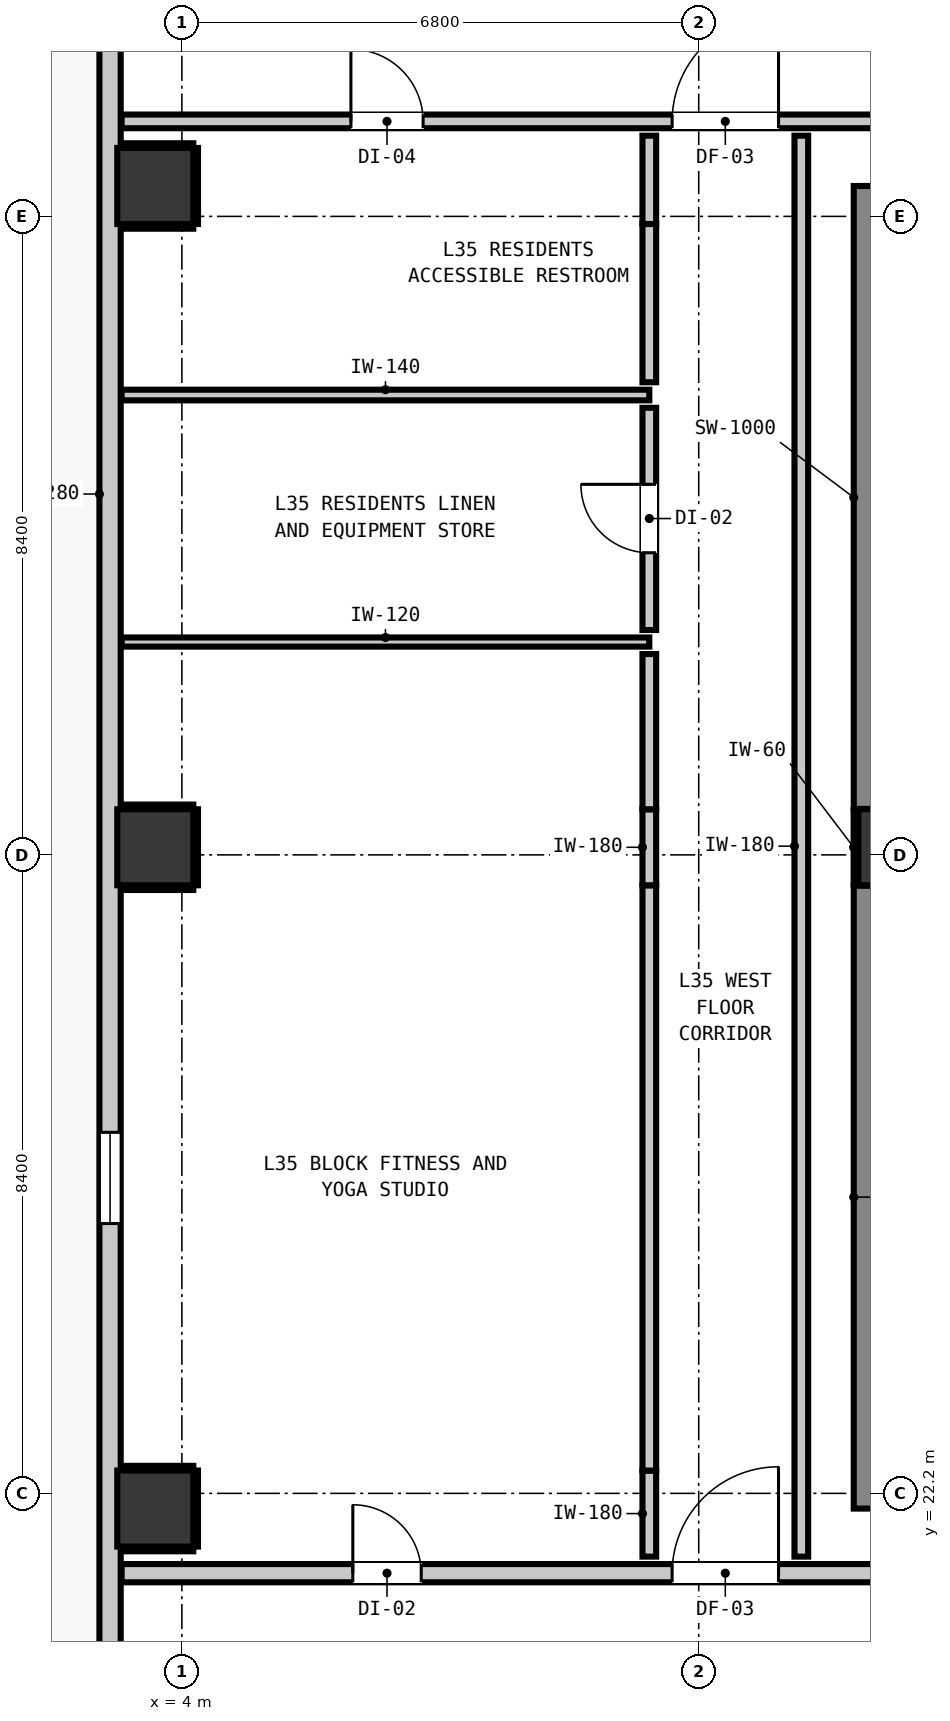
"""IFC4 building model, lengths in metres.
Left out: names, types, materials, properties, quantities, classifications, styles, units other than length and angle.
Written with IfcOpenShell. Run it as: python <this file> out.ifc"""

import sys

from ifc_helpers import new_model, si_unit, direction, frame, frame_2d, origin, origin_2d, place, context, subcontext, project, spatial, rectangle, extrude, element, fill, save


model = new_model("IFC4")
c1 = context("Model", 3, precision=1e-05, world=origin(), true_north=direction((0.0, 1.0)))
c2 = subcontext(c1, "Body", "Model", "MODEL_VIEW")
j1 = project(units=[si_unit("LENGTHUNIT", "METRE"), si_unit("PLANEANGLEUNIT", "RADIAN")], contexts=[c1])
p1 = place(None, origin())
s1 = spatial("IfcSite", under=j1, at=p1, CompositionType="ELEMENT")
p2 = place(p1, origin())
s2 = spatial("IfcBuilding", under=s1, at=p2, CompositionType="ELEMENT")
p3 = place(p2, frame((0.0, 0.0, 122.68)))
s3 = spatial("IfcBuildingStorey", under=s2, at=p3, CompositionType="ELEMENT", Elevation=122.68)
p4 = place(p3, frame((13.4, 30.7, 0.0), z_axis=(0.0, 0.0, 1.0), x_axis=(1.0, 0.0, 0.0)))
e1 = element("IfcColumn", 1, at=p4, inside=s3, PredefinedType="COLUMN", context=c2, shape_type="SweptSolid", body=[
    extrude(rectangle(XDim=1.0, YDim=1.0, at=origin_2d()), origin(), (0.0, 0.0, 1.0), 3.32),
])
p5 = place(p3, frame((13.34, 22.0, 0.0), z_axis=(0.0, 0.0, 1.0), x_axis=(0.0, 1.0, 0.0)))
e2 = element("IfcWall", 2, at=p5, inside=s3, PredefinedType="SHEAR", context=c2, shape_type="SweptSolid", body=[
    extrude(rectangle(XDim=8.195, YDim=1.0, at=frame_2d((4.098, 0.0))), origin(), (0.0, 0.0, 1.0), 3.32),
])
p6 = place(p3, frame((13.34, 31.205, 0.0), z_axis=(0.0, 0.0, 1.0), x_axis=(0.0, 1.0, 0.0)))
e3 = element("IfcWall", 3, at=p6, inside=s3, PredefinedType="SHEAR", context=c2, shape_type="SweptSolid", body=[
    extrude(rectangle(XDim=8.195, YDim=1.0, at=frame_2d((4.097, 0.0))), origin(), (0.0, 0.0, 1.0), 3.32),
])
for number, where, z_axis, x_axis in (
    (4, (3.65, 22.0, 0.0), (0.0, 0.0, 1.0), (1.0, 0.0, 0.0)),
    (5, (3.65, 30.7, 0.0), (0.0, 0.0, 1.0), (1.0, 0.0, 0.0)),
    (6, (3.65, 39.4, 0.0), (0.0, 0.0, 1.0), (1.0, 0.0, 0.0)),
):
    element("IfcColumn", number, at=place(p3, frame(where, z_axis=z_axis, x_axis=x_axis)), inside=s3, PredefinedType="COLUMN", context=c2, shape_type="SweptSolid", body=[
        extrude(rectangle(XDim=1.0, YDim=1.0, at=origin_2d()), origin(), (0.0, 0.0, 1.0), 2.9),
    ])
p7 = place(p3, frame((3.055, 11.355, 0.0), z_axis=(0.0, 0.0, 1.0), x_axis=(0.0, 1.0, 0.0)))
e7 = element("IfcWall", 7, at=p7, inside=s3, PredefinedType="STANDARD", context=c2, shape_type="SweptSolid", body=[
    extrude(rectangle(XDim=32.29, YDim=0.28, at=frame_2d((16.145, 0.0))), origin(), (0.0, 0.0, 1.0), 2.9),
])
p8 = place(p7, frame((5.818, 0.0, 0.0)))
e8 = element("IfcOpeningElement", 8, at=p8, cuts=e7, PredefinedType="OPENING", context=c2, shape_type="SweptSolid", body=[
    extrude(rectangle(XDim=1.0, YDim=2.15, at=frame_2d((0.5, 1.075))), frame((0.0, 0.15, 0.0), z_axis=(0.0, -1.0, 0.0), x_axis=(1.0, 0.0, 0.0)), (0.0, 0.0, 1.0), 0.3),
])
p9 = place(p7, frame((0.47, 0.0, 0.85)))
e9 = element("IfcOpeningElement", 9, at=p9, cuts=e7, PredefinedType="OPENING", context=c2, shape_type="SweptSolid", body=[
    extrude(rectangle(XDim=1.2, YDim=1.8, at=frame_2d((0.6, 0.9))), frame((0.0, 0.15, 0.0), z_axis=(0.0, -1.0, 0.0), x_axis=(1.0, 0.0, 0.0)), (0.0, 0.0, 1.0), 0.3),
])
p10 = place(p7, frame((14.395, 0.0, 0.85)))
e10 = element("IfcOpeningElement", 10, at=p10, cuts=e7, PredefinedType="OPENING", context=c2, shape_type="SweptSolid", body=[
    extrude(rectangle(XDim=1.2, YDim=1.8, at=frame_2d((0.6, 0.9))), frame((0.0, 0.15, 0.0), z_axis=(0.0, -1.0, 0.0), x_axis=(1.0, 0.0, 0.0)), (0.0, 0.0, 1.0), 0.3),
])
p11 = place(p3, frame((3.207, 21.15, 0.0), z_axis=(0.0, 0.0, 1.0), x_axis=(1.0, 0.0, 0.0)))
e11 = element("IfcWall", 11, at=p11, inside=s3, PredefinedType="PARTITIONING", context=c2, shape_type="SweptSolid", body=[
    extrude(rectangle(XDim=39.386, YDim=0.24, at=frame_2d((19.693, 0.0))), origin(), (0.0, 0.0, 1.0), 2.9),
])
p12 = place(p11, frame((15.003, 0.0, 0.0)))
e12 = element("IfcOpeningElement", 12, at=p12, cuts=e11, PredefinedType="OPENING", context=c2, shape_type="SweptSolid", body=[
    extrude(rectangle(XDim=1.1, YDim=2.15, at=frame_2d((0.55, 1.075))), frame((0.0, 0.13, 0.0), z_axis=(0.0, -1.0, 0.0), x_axis=(1.0, 0.0, 0.0)), (0.0, 0.0, 1.0), 0.26),
])
p13 = place(p11, frame((7.243, 0.0, 0.0)))
e13 = element("IfcOpeningElement", 13, at=p13, cuts=e11, PredefinedType="OPENING", context=c2, shape_type="SweptSolid", body=[
    extrude(rectangle(XDim=1.4, YDim=2.15, at=frame_2d((0.7, 1.075))), frame((0.0, 0.13, 0.0), z_axis=(0.0, -1.0, 0.0), x_axis=(1.0, 0.0, 0.0)), (0.0, 0.0, 1.0), 0.26),
])
p14 = place(p11, frame((34.843, 0.0, 0.0)))
e14 = element("IfcOpeningElement", 14, at=p14, cuts=e11, PredefinedType="OPENING", context=c2, shape_type="SweptSolid", body=[
    extrude(rectangle(XDim=1.4, YDim=2.15, at=frame_2d((0.7, 1.075))), frame((0.0, 0.13, 0.0), z_axis=(0.0, -1.0, 0.0), x_axis=(1.0, 0.0, 0.0)), (0.0, 0.0, 1.0), 0.26),
])
p15 = place(p11, frame((3.042, 0.0, 0.0)))
e15 = element("IfcOpeningElement", 15, at=p15, cuts=e11, PredefinedType="OPENING", context=c2, shape_type="SweptSolid", body=[
    extrude(rectangle(XDim=0.9, YDim=2.1, at=frame_2d((0.45, 1.05))), frame((0.0, 0.13, 0.0), z_axis=(0.0, -1.0, 0.0), x_axis=(1.0, 0.0, 0.0)), (0.0, 0.0, 1.0), 0.26),
])
p16 = place(p3, frame((3.207, 40.25, 0.0), z_axis=(0.0, 0.0, 1.0), x_axis=(1.0, 0.0, 0.0)))
e16 = element("IfcWall", 16, at=p16, inside=s3, PredefinedType="PARTITIONING", context=c2, shape_type="SweptSolid", body=[
    extrude(rectangle(XDim=39.386, YDim=0.18, at=frame_2d((19.693, 0.0))), origin(), (0.0, 0.0, 1.0), 2.9),
])
p17 = place(p16, frame((14.228, 0.0, 0.0)))
e17 = element("IfcOpeningElement", 17, at=p17, cuts=e16, PredefinedType="OPENING", context=c2, shape_type="SweptSolid", body=[
    extrude(rectangle(XDim=1.4, YDim=2.15, at=frame_2d((0.7, 1.075))), frame((0.0, 0.1, 0.0), z_axis=(0.0, -1.0, 0.0), x_axis=(1.0, 0.0, 0.0)), (0.0, 0.0, 1.0), 0.2),
])
p18 = place(p16, frame((7.243, 0.0, 0.0)))
e18 = element("IfcOpeningElement", 18, at=p18, cuts=e16, PredefinedType="OPENING", context=c2, shape_type="SweptSolid", body=[
    extrude(rectangle(XDim=1.4, YDim=2.15, at=frame_2d((0.7, 1.075))), frame((0.0, 0.1, 0.0), z_axis=(0.0, -1.0, 0.0), x_axis=(1.0, 0.0, 0.0)), (0.0, 0.0, 1.0), 0.2),
])
p19 = place(p16, frame((34.843, 0.0, 0.0)))
e19 = element("IfcOpeningElement", 19, at=p19, cuts=e16, PredefinedType="OPENING", context=c2, shape_type="SweptSolid", body=[
    extrude(rectangle(XDim=1.4, YDim=2.15, at=frame_2d((0.7, 1.075))), frame((0.0, 0.1, 0.0), z_axis=(0.0, -1.0, 0.0), x_axis=(1.0, 0.0, 0.0)), (0.0, 0.0, 1.0), 0.2),
])
p20 = place(p16, frame((3.017, 0.0, 0.0)))
e20 = element("IfcOpeningElement", 20, at=p20, cuts=e16, PredefinedType="OPENING", context=c2, shape_type="SweptSolid", body=[
    extrude(rectangle(XDim=0.95, YDim=2.1, at=frame_2d((0.475, 1.05))), frame((0.0, 0.1, 0.0), z_axis=(0.0, -1.0, 0.0), x_axis=(1.0, 0.0, 0.0)), (0.0, 0.0, 1.0), 0.2),
])
p21 = place(p16, frame((37.414, 0.0, 0.0)))
e21 = element("IfcOpeningElement", 21, at=p21, cuts=e16, PredefinedType="OPENING", context=c2, shape_type="SweptSolid", body=[
    extrude(rectangle(XDim=0.9, YDim=2.1, at=frame_2d((0.45, 1.05))), frame((0.0, 0.1, 0.0), z_axis=(0.0, -1.0, 0.0), x_axis=(1.0, 0.0, 0.0)), (0.0, 0.0, 1.0), 0.2),
])
p22 = place(p3, frame((3.207, 36.65, 0.0), z_axis=(0.0, 0.0, 1.0), x_axis=(1.0, 0.0, 0.0)))
e22 = element("IfcWall", 22, at=p22, inside=s3, PredefinedType="PARTITIONING", context=c2, shape_type="SweptSolid", body=[
    extrude(rectangle(XDim=6.943, YDim=0.14, at=frame_2d((3.471, 0.0))), origin(), (0.0, 0.0, 1.0), 2.9),
])
p23 = place(p3, frame((3.207, 33.4, 0.0), z_axis=(0.0, 0.0, 1.0), x_axis=(1.0, 0.0, 0.0)))
e23 = element("IfcWall", 23, at=p23, inside=s3, PredefinedType="PARTITIONING", context=c2, shape_type="SweptSolid", body=[
    extrude(rectangle(XDim=6.943, YDim=0.12, at=frame_2d((3.471, 0.0))), origin(), (0.0, 0.0, 1.0), 2.9),
])
p24 = place(p3, frame((10.15, 21.368, 0.0), z_axis=(0.0, 0.0, 1.0), x_axis=(0.0, 1.0, 0.0)))
e24 = element("IfcWall", 24, at=p24, inside=s3, PredefinedType="PARTITIONING", context=c2, shape_type="SweptSolid", body=[
    extrude(rectangle(XDim=1.132, YDim=0.18, at=frame_2d((0.566, 0.0))), origin(), (0.0, 0.0, 1.0), 2.9),
])
p25 = place(p3, frame((10.15, 22.5, 0.0), z_axis=(0.0, 0.0, 1.0), x_axis=(0.0, 1.0, 0.0)))
e25 = element("IfcWall", 25, at=p25, inside=s3, PredefinedType="PARTITIONING", context=c2, shape_type="SweptSolid", body=[
    extrude(rectangle(XDim=7.7, YDim=0.18, at=frame_2d((3.85, 0.0))), origin(), (0.0, 0.0, 1.0), 2.285),
])
p26 = place(p3, frame((10.15, 30.2, 0.0), z_axis=(0.0, 0.0, 1.0), x_axis=(0.0, 1.0, 0.0)))
e26 = element("IfcWall", 26, at=p26, inside=s3, PredefinedType="PARTITIONING", context=c2, shape_type="SweptSolid", body=[
    extrude(rectangle(XDim=1.0, YDim=0.18, at=frame_2d((0.5, 0.0))), origin(), (0.0, 0.0, 1.0), 2.9),
])
p27 = place(p3, frame((10.15, 31.2, 0.0), z_axis=(0.0, 0.0, 1.0), x_axis=(0.0, 1.0, 0.0)))
e27 = element("IfcWall", 27, at=p27, inside=s3, PredefinedType="PARTITIONING", context=c2, shape_type="SweptSolid", body=[
    extrude(rectangle(XDim=2.042, YDim=0.18, at=frame_2d((1.021, 0.0))), origin(), (0.0, 0.0, 1.0), 2.285),
])
p28 = place(p3, frame((10.15, 33.558, 0.0), z_axis=(0.0, 0.0, 1.0), x_axis=(0.0, 1.0, 0.0)))
e28 = element("IfcWall", 28, at=p28, inside=s3, PredefinedType="PARTITIONING", context=c2, shape_type="SweptSolid", body=[
    extrude(rectangle(XDim=2.924, YDim=0.18, at=frame_2d((1.462, 0.0))), origin(), (0.0, 0.0, 1.0), 2.285),
])
p29 = place(p28, frame((1.017, 0.0, 0.0)))
e29 = element("IfcOpeningElement", 29, at=p29, cuts=e28, PredefinedType="OPENING", context=c2, shape_type="SweptSolid", body=[
    extrude(rectangle(XDim=0.9, YDim=2.1, at=frame_2d((0.45, 1.05))), frame((0.0, 0.1, 0.0), z_axis=(0.0, -1.0, 0.0), x_axis=(1.0, 0.0, 0.0)), (0.0, 0.0, 1.0), 0.2),
])
p30 = place(p3, frame((10.15, 36.818, 0.0), z_axis=(0.0, 0.0, 1.0), x_axis=(0.0, 1.0, 0.0)))
e30 = element("IfcWall", 30, at=p30, inside=s3, PredefinedType="PARTITIONING", context=c2, shape_type="SweptSolid", body=[
    extrude(rectangle(XDim=2.082, YDim=0.18, at=frame_2d((1.041, 0.0))), origin(), (0.0, 0.0, 1.0), 2.285),
])
p31 = place(p3, frame((10.15, 38.9, 0.0), z_axis=(0.0, 0.0, 1.0), x_axis=(0.0, 1.0, 0.0)))
e31 = element("IfcWall", 31, at=p31, inside=s3, PredefinedType="PARTITIONING", context=c2, shape_type="SweptSolid", body=[
    extrude(rectangle(XDim=1.162, YDim=0.18, at=frame_2d((0.581, 0.0))), origin(), (0.0, 0.0, 1.0), 2.9),
])
p32 = place(p3, frame((12.15, 21.368, 0.0), z_axis=(0.0, 0.0, 1.0), x_axis=(0.0, 1.0, 0.0)))
e32 = element("IfcWall", 32, at=p32, inside=s3, PredefinedType="PARTITIONING", context=c2, shape_type="SweptSolid", body=[
    extrude(rectangle(XDim=18.694, YDim=0.18, at=frame_2d((9.347, 0.0))), origin(), (0.0, 0.0, 1.0), 2.9),
])
p33 = place(p3, frame((12.868, 30.21, 0.0), z_axis=(0.0, 0.0, 1.0), x_axis=(0.0, 1.0, 0.0)))
e33 = element("IfcWall", 33, at=p33, inside=s3, PredefinedType="PARTITIONING", context=c2, shape_type="SweptSolid", body=[
    extrude(rectangle(XDim=0.98, YDim=0.06, at=frame_2d((0.49, 0.0))), origin(), (0.0, 0.0, 1.0), 0.905),
])
for number, where, z_axis, x_axis in (
    (34, (3.21, 21.468, 0.0), (0.0, 0.0, 1.0), (1.0, 0.0, 0.0)),
    (35, (3.21, 22.532, 0.0), (0.0, 0.0, 1.0), (1.0, 0.0, 0.0)),
):
    element("IfcWall", number, at=place(p3, frame(where, z_axis=z_axis, x_axis=x_axis)), inside=s3, PredefinedType="PARTITIONING", context=c2, shape_type="SweptSolid", body=[
        extrude(rectangle(XDim=0.94, YDim=0.06, at=frame_2d((0.47, 0.0))), origin(), (0.0, 0.0, 1.0), 0.905),
    ])
p34 = place(p3, frame((4.182, 21.5, 0.0), z_axis=(0.0, 0.0, 1.0), x_axis=(0.0, 1.0, 0.0)))
e36 = element("IfcWall", 36, at=p34, inside=s3, PredefinedType="PARTITIONING", context=c2, shape_type="SweptSolid", body=[
    extrude(rectangle(XDim=1.0, YDim=0.06, at=frame_2d((0.5, 0.0))), origin(), (0.0, 0.0, 1.0), 1.45),
])
for number, where, z_axis, x_axis in (
    (37, (3.21, 30.168, 0.0), (0.0, 0.0, 1.0), (1.0, 0.0, 0.0)),
    (38, (3.21, 31.232, 0.0), (0.0, 0.0, 1.0), (1.0, 0.0, 0.0)),
):
    element("IfcWall", number, at=place(p3, frame(where, z_axis=z_axis, x_axis=x_axis)), inside=s3, PredefinedType="PARTITIONING", context=c2, shape_type="SweptSolid", body=[
        extrude(rectangle(XDim=0.94, YDim=0.06, at=frame_2d((0.47, 0.0))), origin(), (0.0, 0.0, 1.0), 0.905),
    ])
p35 = place(p3, frame((4.182, 30.2, 0.0), z_axis=(0.0, 0.0, 1.0), x_axis=(0.0, 1.0, 0.0)))
e39 = element("IfcWall", 39, at=p35, inside=s3, PredefinedType="PARTITIONING", context=c2, shape_type="SweptSolid", body=[
    extrude(rectangle(XDim=1.0, YDim=0.06, at=frame_2d((0.5, 0.0))), origin(), (0.0, 0.0, 1.0), 1.45),
])
for number, where, z_axis, x_axis in (
    (40, (3.21, 38.868, 0.0), (0.0, 0.0, 1.0), (1.0, 0.0, 0.0)),
    (41, (3.21, 39.932, 0.0), (0.0, 0.0, 1.0), (1.0, 0.0, 0.0)),
):
    element("IfcWall", number, at=place(p3, frame(where, z_axis=z_axis, x_axis=x_axis)), inside=s3, PredefinedType="PARTITIONING", context=c2, shape_type="SweptSolid", body=[
        extrude(rectangle(XDim=0.94, YDim=0.06, at=frame_2d((0.47, 0.0))), origin(), (0.0, 0.0, 1.0), 0.905),
    ])
p36 = place(p3, frame((4.182, 38.9, 0.0), z_axis=(0.0, 0.0, 1.0), x_axis=(0.0, 1.0, 0.0)))
e42 = element("IfcWall", 42, at=p36, inside=s3, PredefinedType="PARTITIONING", context=c2, shape_type="SweptSolid", body=[
    extrude(rectangle(XDim=1.0, YDim=0.06, at=frame_2d((0.5, 0.0))), origin(), (0.0, 0.0, 1.0), 1.45),
])
p37 = place(p10, origin())
e43 = element("IfcWindow", 43, at=p37, inside=s3, PartitioningType="SINGLE_PANEL", PredefinedType="WINDOW", context=c2, shape_type="SweptSolid", body=[
    extrude(rectangle(XDim=1.2, YDim=1.8, at=frame_2d((0.6, 0.9))), frame((0.0, 0.03, 0.0), z_axis=(0.0, -1.0, 0.0), x_axis=(1.0, 0.0, 0.0)), (0.0, 0.0, 1.0), 0.06),
])
fill(e10, e43)
p38 = place(p13, origin())
e44 = element("IfcDoor", 44, at=p38, inside=s3, OperationType="SINGLE_SWING_RIGHT", PredefinedType="DOOR", context=c2, shape_type="SweptSolid", body=[
    extrude(rectangle(XDim=1.4, YDim=2.15, at=frame_2d((0.7, 1.075))), frame((0.0, 0.025, 0.0), z_axis=(0.0, -1.0, 0.0), x_axis=(1.0, 0.0, 0.0)), (0.0, 0.0, 1.0), 0.05),
])
fill(e13, e44)
p39 = place(p18, origin())
e45 = element("IfcDoor", 45, at=p39, inside=s3, OperationType="SINGLE_SWING_RIGHT", PredefinedType="DOOR", context=c2, shape_type="SweptSolid", body=[
    extrude(rectangle(XDim=1.4, YDim=2.15, at=frame_2d((0.7, 1.075))), frame((0.0, 0.025, 0.0), z_axis=(0.0, -1.0, 0.0), x_axis=(1.0, 0.0, 0.0)), (0.0, 0.0, 1.0), 0.05),
])
fill(e18, e45)
p40 = place(p15, origin())
e46 = element("IfcDoor", 46, at=p40, inside=s3, OperationType="SINGLE_SWING_LEFT", PredefinedType="DOOR", context=c2, shape_type="SweptSolid", body=[
    extrude(rectangle(XDim=0.9, YDim=2.1, at=frame_2d((0.45, 1.05))), frame((0.0, 0.025, 0.0), z_axis=(0.0, -1.0, 0.0), x_axis=(1.0, 0.0, 0.0)), (0.0, 0.0, 1.0), 0.05),
])
fill(e15, e46)
p41 = place(p29, origin())
e47 = element("IfcDoor", 47, at=p41, inside=s3, OperationType="SINGLE_SWING_RIGHT", PredefinedType="DOOR", context=c2, shape_type="SweptSolid", body=[
    extrude(rectangle(XDim=0.9, YDim=2.1, at=frame_2d((0.45, 1.05))), frame((0.0, 0.025, 0.0), z_axis=(0.0, -1.0, 0.0), x_axis=(1.0, 0.0, 0.0)), (0.0, 0.0, 1.0), 0.05),
])
fill(e29, e47)
p42 = place(p20, origin())
e48 = element("IfcDoor", 48, at=p42, inside=s3, OperationType="SINGLE_SWING_LEFT", PredefinedType="DOOR", context=c2, shape_type="SweptSolid", body=[
    extrude(rectangle(XDim=0.95, YDim=2.1, at=frame_2d((0.475, 1.05))), frame((0.0, 0.025, 0.0), z_axis=(0.0, -1.0, 0.0), x_axis=(1.0, 0.0, 0.0)), (0.0, 0.0, 1.0), 0.05),
])
fill(e20, e48)
save(model, sys.argv[1])
